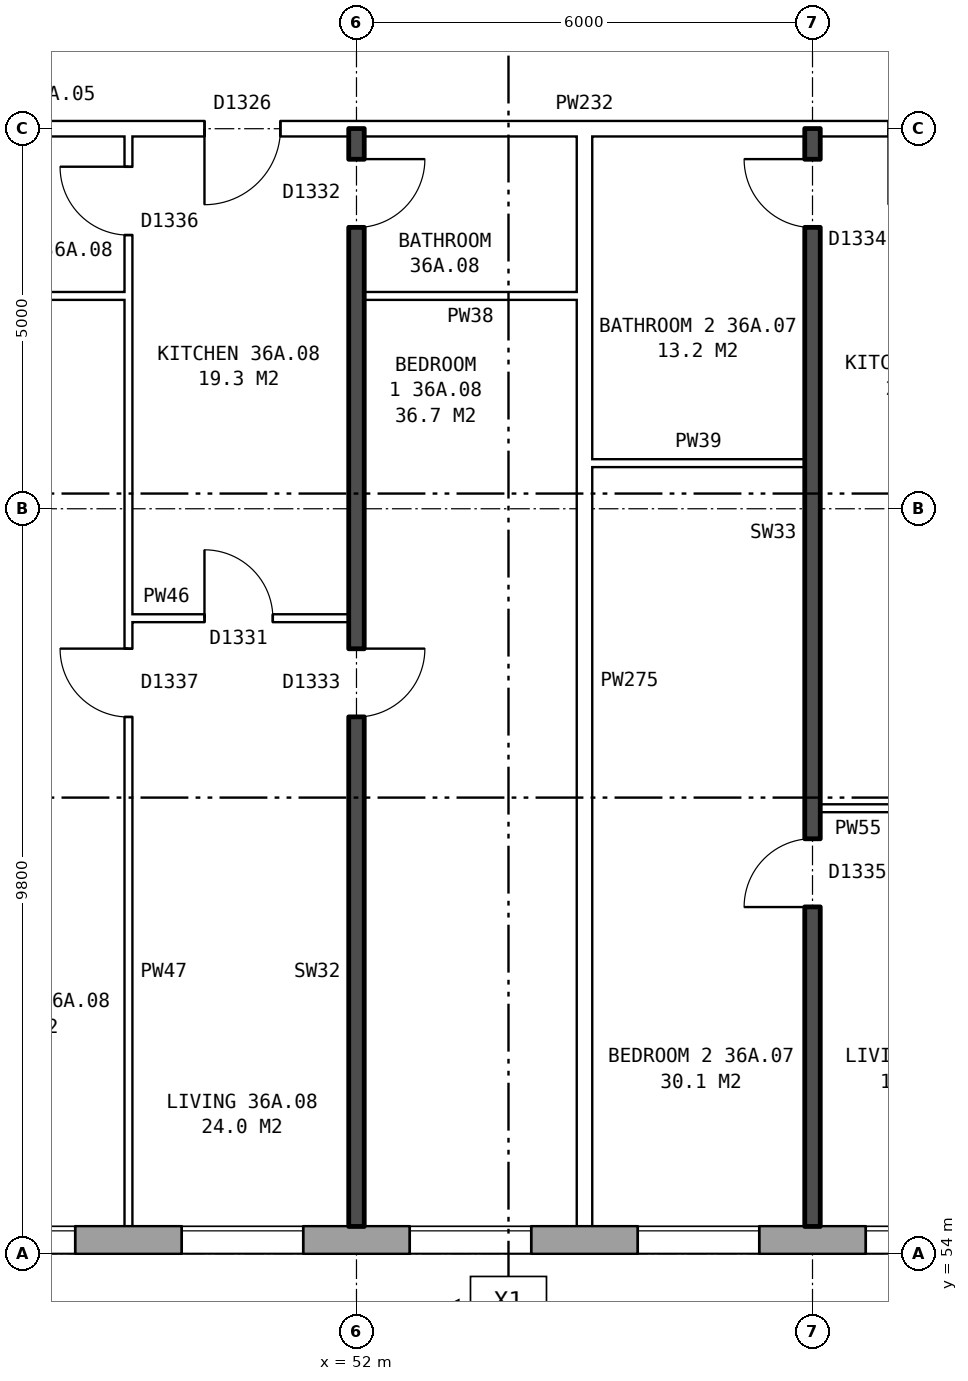
"""IFC4 building model, lengths in metres.
Left out: names, types, materials, properties, quantities, classifications, styles, units other than length and angle.
Written with IfcOpenShell. Run it as: python <this file> out.ifc"""

import sys

from ifc_helpers import new_model, si_unit, direction, frame, frame_2d, origin, place, context, subcontext, project, spatial, rectangle, extrude, element, fill, save


model = new_model("IFC4")
c1 = context("Model", 3, precision=1e-05, world=origin(), true_north=direction((0.0, 1.0)))
c2 = subcontext(c1, "Body", "Model", "MODEL_VIEW")
j1 = project(units=[si_unit("LENGTHUNIT", "METRE"), si_unit("PLANEANGLEUNIT", "RADIAN")], contexts=[c1])
p1 = place(None, origin())
s1 = spatial("IfcSite", under=j1, at=p1, CompositionType="ELEMENT")
p2 = place(p1, origin())
s2 = spatial("IfcBuilding", under=s1, at=p2, CompositionType="ELEMENT")
p3 = place(p2, frame((0.0, 0.0, 129.9)))
s3 = spatial("IfcBuildingStorey", under=s2, at=p3, CompositionType="ELEMENT", Elevation=129.9)
p4 = place(p3, frame((29.825, 54.18, 0.0), z_axis=(0.0, 0.0, 1.0), x_axis=(1.0, 0.0, 0.0)))
e1 = element("IfcWall", 1, at=p4, inside=s3, PredefinedType="STANDARD", context=c2, shape_type="SweptSolid", body=[
    extrude(rectangle(XDim=43.101, YDim=0.36, at=frame_2d((21.55, 0.0))), origin(), (0.0, 0.0, 1.0), 2.85),
])
p5 = place(p4, frame((1.875, 0.0, 0.8)))
e2 = element("IfcOpeningElement", 2, at=p5, cuts=e1, PredefinedType="OPENING", context=c2, shape_type="SweptSolid", body=[
    extrude(rectangle(XDim=1.6, YDim=1.8, at=frame_2d((0.8, 0.9))), frame((0.0, 0.19, 0.0), z_axis=(0.0, -1.0, 0.0), x_axis=(1.0, 0.0, 0.0)), (0.0, 0.0, 1.0), 0.38),
])
p6 = place(p4, frame((4.875, 0.0, 0.8)))
e3 = element("IfcOpeningElement", 3, at=p6, cuts=e1, PredefinedType="OPENING", context=c2, shape_type="SweptSolid", body=[
    extrude(rectangle(XDim=1.6, YDim=1.8, at=frame_2d((0.8, 0.9))), frame((0.0, 0.19, 0.0), z_axis=(0.0, -1.0, 0.0), x_axis=(1.0, 0.0, 0.0)), (0.0, 0.0, 1.0), 0.38),
])
p7 = place(p4, frame((6.775, 0.0, 0.8)))
e4 = element("IfcOpeningElement", 4, at=p7, cuts=e1, PredefinedType="OPENING", context=c2, shape_type="SweptSolid", body=[
    extrude(rectangle(XDim=1.6, YDim=1.8, at=frame_2d((0.8, 0.9))), frame((0.0, 0.19, 0.0), z_axis=(0.0, -1.0, 0.0), x_axis=(1.0, 0.0, 0.0)), (0.0, 0.0, 1.0), 0.38),
])
p8 = place(p4, frame((10.875, 0.0, 0.8)))
e5 = element("IfcOpeningElement", 5, at=p8, cuts=e1, PredefinedType="OPENING", context=c2, shape_type="SweptSolid", body=[
    extrude(rectangle(XDim=0.8, YDim=0.9, at=frame_2d((0.4, 0.45))), frame((0.0, 0.19, 0.0), z_axis=(0.0, -1.0, 0.0), x_axis=(1.0, 0.0, 0.0)), (0.0, 0.0, 1.0), 0.38),
])
p9 = place(p4, frame((13.875, 0.0, 0.8)))
e6 = element("IfcOpeningElement", 6, at=p9, cuts=e1, PredefinedType="OPENING", context=c2, shape_type="SweptSolid", body=[
    extrude(rectangle(XDim=1.6, YDim=1.8, at=frame_2d((0.8, 0.9))), frame((0.0, 0.19, 0.0), z_axis=(0.0, -1.0, 0.0), x_axis=(1.0, 0.0, 0.0)), (0.0, 0.0, 1.0), 0.38),
])
p10 = place(p4, frame((16.875, 0.0, 0.8)))
e7 = element("IfcOpeningElement", 7, at=p10, cuts=e1, PredefinedType="OPENING", context=c2, shape_type="SweptSolid", body=[
    extrude(rectangle(XDim=1.6, YDim=1.8, at=frame_2d((0.8, 0.9))), frame((0.0, 0.19, 0.0), z_axis=(0.0, -1.0, 0.0), x_axis=(1.0, 0.0, 0.0)), (0.0, 0.0, 1.0), 0.38),
])
p11 = place(p4, frame((19.875, 0.0, 0.8)))
e8 = element("IfcOpeningElement", 8, at=p11, cuts=e1, PredefinedType="OPENING", context=c2, shape_type="SweptSolid", body=[
    extrude(rectangle(XDim=1.6, YDim=1.8, at=frame_2d((0.8, 0.9))), frame((0.0, 0.19, 0.0), z_axis=(0.0, -1.0, 0.0), x_axis=(1.0, 0.0, 0.0)), (0.0, 0.0, 1.0), 0.38),
])
p12 = place(p4, frame((22.875, 0.0, 0.8)))
e9 = element("IfcOpeningElement", 9, at=p12, cuts=e1, PredefinedType="OPENING", context=c2, shape_type="SweptSolid", body=[
    extrude(rectangle(XDim=1.6, YDim=1.8, at=frame_2d((0.8, 0.9))), frame((0.0, 0.19, 0.0), z_axis=(0.0, -1.0, 0.0), x_axis=(1.0, 0.0, 0.0)), (0.0, 0.0, 1.0), 0.38),
])
p13 = place(p4, frame((25.875, 0.0, 0.8)))
e10 = element("IfcOpeningElement", 10, at=p13, cuts=e1, PredefinedType="OPENING", context=c2, shape_type="SweptSolid", body=[
    extrude(rectangle(XDim=1.6, YDim=1.8, at=frame_2d((0.8, 0.9))), frame((0.0, 0.19, 0.0), z_axis=(0.0, -1.0, 0.0), x_axis=(1.0, 0.0, 0.0)), (0.0, 0.0, 1.0), 0.38),
])
p14 = place(p4, frame((28.875, 0.0, 0.8)))
e11 = element("IfcOpeningElement", 11, at=p14, cuts=e1, PredefinedType="OPENING", context=c2, shape_type="SweptSolid", body=[
    extrude(rectangle(XDim=1.6, YDim=1.8, at=frame_2d((0.8, 0.9))), frame((0.0, 0.19, 0.0), z_axis=(0.0, -1.0, 0.0), x_axis=(1.0, 0.0, 0.0)), (0.0, 0.0, 1.0), 0.38),
])
p15 = place(p4, frame((31.325, 0.0, 0.15)))
e12 = element("IfcOpeningElement", 12, at=p15, cuts=e1, PredefinedType="OPENING", context=c2, shape_type="SweptSolid", body=[
    extrude(rectangle(XDim=0.6, YDim=1.8, at=frame_2d((0.3, 0.9))), frame((0.0, 0.19, 0.0), z_axis=(0.0, -1.0, 0.0), x_axis=(1.0, 0.0, 0.0)), (0.0, 0.0, 1.0), 0.38),
])
p16 = place(p4, frame((34.875, 0.0, 0.8)))
e13 = element("IfcOpeningElement", 13, at=p16, cuts=e1, PredefinedType="OPENING", context=c2, shape_type="SweptSolid", body=[
    extrude(rectangle(XDim=1.6, YDim=1.8, at=frame_2d((0.8, 0.9))), frame((0.0, 0.19, 0.0), z_axis=(0.0, -1.0, 0.0), x_axis=(1.0, 0.0, 0.0)), (0.0, 0.0, 1.0), 0.38),
])
p17 = place(p4, frame((37.875, 0.0, 0.8)))
e14 = element("IfcOpeningElement", 14, at=p17, cuts=e1, PredefinedType="OPENING", context=c2, shape_type="SweptSolid", body=[
    extrude(rectangle(XDim=1.6, YDim=1.8, at=frame_2d((0.8, 0.9))), frame((0.0, 0.19, 0.0), z_axis=(0.0, -1.0, 0.0), x_axis=(1.0, 0.0, 0.0)), (0.0, 0.0, 1.0), 0.38),
])
p18 = place(p4, frame((40.875, 0.0, 0.8)))
e15 = element("IfcOpeningElement", 15, at=p18, cuts=e1, PredefinedType="OPENING", context=c2, shape_type="SweptSolid", body=[
    extrude(rectangle(XDim=1.6, YDim=1.8, at=frame_2d((0.8, 0.9))), frame((0.0, 0.19, 0.0), z_axis=(0.0, -1.0, 0.0), x_axis=(1.0, 0.0, 0.0)), (0.0, 0.0, 1.0), 0.38),
])
p19 = place(p4, frame((8.675, 0.0, 1.3)))
e16 = element("IfcOpeningElement", 16, at=p19, cuts=e1, PredefinedType="OPENING", context=c2, shape_type="SweptSolid", body=[
    extrude(rectangle(XDim=0.6, YDim=1.2, at=frame_2d((0.3, 0.6))), frame((0.0, 0.19, 0.0), z_axis=(0.0, -1.0, 0.0), x_axis=(1.0, 0.0, 0.0)), (0.0, 0.0, 1.0), 0.38),
])
p20 = place(p4, frame((11.975, 0.0, 0.8)))
e17 = element("IfcOpeningElement", 17, at=p20, cuts=e1, PredefinedType="OPENING", context=c2, shape_type="SweptSolid", body=[
    extrude(rectangle(XDim=1.6, YDim=1.8, at=frame_2d((0.8, 0.9))), frame((0.0, 0.19, 0.0), z_axis=(0.0, -1.0, 0.0), x_axis=(1.0, 0.0, 0.0)), (0.0, 0.0, 1.0), 0.38),
])
p21 = place(p4, frame((32.225, 0.0, 0.25)))
e18 = element("IfcOpeningElement", 18, at=p21, cuts=e1, PredefinedType="OPENING", context=c2, shape_type="SweptSolid", body=[
    extrude(rectangle(XDim=0.6, YDim=0.9, at=frame_2d((0.3, 0.45))), frame((0.0, 0.19, 0.0), z_axis=(0.0, -1.0, 0.0), x_axis=(1.0, 0.0, 0.0)), (0.0, 0.0, 1.0), 0.38),
])
p22 = place(p3, frame((58.1, 59.86, 0.0), z_axis=(0.0, 0.0, 1.0), x_axis=(1.0, 0.0, 0.0)))
e19 = element("IfcWall", 19, at=p22, inside=s3, PredefinedType="PARTITIONING", context=c2, shape_type="SweptSolid", body=[
    extrude(rectangle(XDim=2.9, YDim=0.1, at=frame_2d((1.45, 0.0))), origin(), (0.0, 0.0, 1.0), 2.85),
])
p23 = place(p22, frame((1.0, 0.0, 0.0)))
e20 = element("IfcOpeningElement", 20, at=p23, cuts=e19, PredefinedType="OPENING", context=c2, shape_type="SweptSolid", body=[
    extrude(rectangle(XDim=0.9, YDim=2.1, at=frame_2d((0.45, 1.05))), frame((0.0, 0.06, 0.0), z_axis=(0.0, -1.0, 0.0), x_axis=(1.0, 0.0, 0.0)), (0.0, 0.0, 1.0), 0.12),
])
p24 = place(p3, frame((49.0, 62.36, 0.0), z_axis=(0.0, 0.0, 1.0), x_axis=(1.0, 0.0, 0.0)))
e21 = element("IfcWall", 21, at=p24, inside=s3, PredefinedType="PARTITIONING", context=c2, shape_type="SweptSolid", body=[
    extrude(rectangle(XDim=2.9, YDim=0.1, at=frame_2d((1.45, 0.0))), origin(), (0.0, 0.0, 1.0), 2.85),
])
p25 = place(p24, frame((1.0, 0.0, 0.0)))
e22 = element("IfcOpeningElement", 22, at=p25, cuts=e21, PredefinedType="OPENING", context=c2, shape_type="SweptSolid", body=[
    extrude(rectangle(XDim=0.9, YDim=2.1, at=frame_2d((0.45, 1.05))), frame((0.0, 0.06, 0.0), z_axis=(0.0, -1.0, 0.0), x_axis=(1.0, 0.0, 0.0)), (0.0, 0.0, 1.0), 0.12),
])
p26 = place(p3, frame((55.1, 64.4, 0.0), z_axis=(0.0, 0.0, 1.0), x_axis=(1.0, 0.0, 0.0)))
e23 = element("IfcWall", 23, at=p26, inside=s3, PredefinedType="PARTITIONING", context=c2, shape_type="SweptSolid", body=[
    extrude(rectangle(XDim=2.8, YDim=0.1, at=frame_2d((1.4, 0.0))), origin(), (0.0, 0.0, 1.0), 2.85),
])
p27 = place(p3, frame((46.1, 66.6, 0.0), z_axis=(0.0, 0.0, 1.0), x_axis=(1.0, 0.0, 0.0)))
e24 = element("IfcWall", 24, at=p27, inside=s3, PredefinedType="PARTITIONING", context=c2, shape_type="SweptSolid", body=[
    extrude(rectangle(XDim=2.9, YDim=0.1, at=frame_2d((1.45, 0.0))), origin(), (0.0, 0.0, 1.0), 2.85),
])
p28 = place(p3, frame((52.1, 66.6, 0.0), z_axis=(0.0, 0.0, 1.0), x_axis=(1.0, 0.0, 0.0)))
e25 = element("IfcWall", 25, at=p28, inside=s3, PredefinedType="PARTITIONING", context=c2, shape_type="SweptSolid", body=[
    extrude(rectangle(XDim=2.8, YDim=0.1, at=frame_2d((1.4, 0.0))), origin(), (0.0, 0.0, 1.0), 2.85),
])
p29 = place(p3, frame((44.36, 68.8, 0.0), z_axis=(0.0, 0.0, 1.0), x_axis=(1.0, 0.0, 0.0)))
e26 = element("IfcWall", 26, at=p29, inside=s3, PredefinedType="PARTITIONING", context=c2, shape_type="SweptSolid", body=[
    extrude(rectangle(XDim=19.28, YDim=0.2, at=frame_2d((9.64, 0.0))), origin(), (0.0, 0.0, 1.0), 2.85),
])
p30 = place(p29, frame((14.64, 0.0, 0.0)))
e27 = element("IfcOpeningElement", 27, at=p30, cuts=e26, PredefinedType="OPENING", context=c2, shape_type="SweptSolid", body=[
    extrude(rectangle(XDim=1.0, YDim=2.1, at=frame_2d((0.5, 1.05))), frame((0.0, 0.11, 0.0), z_axis=(0.0, -1.0, 0.0), x_axis=(1.0, 0.0, 0.0)), (0.0, 0.0, 1.0), 0.22),
])
p31 = place(p29, frame((5.64, 0.0, 0.0)))
e28 = element("IfcOpeningElement", 28, at=p31, cuts=e26, PredefinedType="OPENING", context=c2, shape_type="SweptSolid", body=[
    extrude(rectangle(XDim=1.0, YDim=2.1, at=frame_2d((0.5, 1.05))), frame((0.0, 0.11, 0.0), z_axis=(0.0, -1.0, 0.0), x_axis=(1.0, 0.0, 0.0)), (0.0, 0.0, 1.0), 0.22),
])
p32 = place(p3, frame((49.0, 54.36, 0.0), z_axis=(0.0, 0.0, 1.0), x_axis=(0.0, 1.0, 0.0)))
e29 = element("IfcWall", 29, at=p32, inside=s3, PredefinedType="PARTITIONING", context=c2, shape_type="SweptSolid", body=[
    extrude(rectangle(XDim=14.34, YDim=0.1, at=frame_2d((7.17, 0.0))), origin(), (0.0, 0.0, 1.0), 2.85),
])
p33 = place(p32, frame((6.7, 0.0, 0.0)))
e30 = element("IfcOpeningElement", 30, at=p33, cuts=e29, PredefinedType="OPENING", context=c2, shape_type="SweptSolid", body=[
    extrude(rectangle(XDim=0.9, YDim=2.1, at=frame_2d((0.45, 1.05))), frame((0.0, 0.06, 0.0), z_axis=(0.0, -1.0, 0.0), x_axis=(1.0, 0.0, 0.0)), (0.0, 0.0, 1.0), 0.12),
])
p34 = place(p32, frame((13.04, 0.0, 0.0)))
e31 = element("IfcOpeningElement", 31, at=p34, cuts=e29, PredefinedType="OPENING", context=c2, shape_type="SweptSolid", body=[
    extrude(rectangle(XDim=0.9, YDim=2.1, at=frame_2d((0.45, 1.05))), frame((0.0, 0.06, 0.0), z_axis=(0.0, -1.0, 0.0), x_axis=(1.0, 0.0, 0.0)), (0.0, 0.0, 1.0), 0.12),
])
p35 = place(p3, frame((52.0, 54.36, 0.0), z_axis=(0.0, 0.0, 1.0), x_axis=(0.0, 1.0, 0.0)))
e32 = element("IfcWall", 32, at=p35, inside=s3, PredefinedType="SOLIDWALL", context=c2, shape_type="SweptSolid", body=[
    extrude(rectangle(XDim=14.44, YDim=0.2, at=frame_2d((7.22, 0.0))), origin(), (0.0, 0.0, 1.0), 2.85),
])
p36 = place(p35, frame((6.7, 0.0, 0.0)))
e33 = element("IfcOpeningElement", 33, at=p36, cuts=e32, PredefinedType="OPENING", context=c2, shape_type="SweptSolid", body=[
    extrude(rectangle(XDim=0.9, YDim=2.1, at=frame_2d((0.45, 1.05))), frame((0.0, 0.11, 0.0), z_axis=(0.0, -1.0, 0.0), x_axis=(1.0, 0.0, 0.0)), (0.0, 0.0, 1.0), 0.22),
])
p37 = place(p35, frame((13.14, 0.0, 0.0)))
e34 = element("IfcOpeningElement", 34, at=p37, cuts=e32, PredefinedType="OPENING", context=c2, shape_type="SweptSolid", body=[
    extrude(rectangle(XDim=0.9, YDim=2.1, at=frame_2d((0.45, 1.05))), frame((0.0, 0.11, 0.0), z_axis=(0.0, -1.0, 0.0), x_axis=(1.0, 0.0, 0.0)), (0.0, 0.0, 1.0), 0.22),
])
p38 = place(p3, frame((55.0, 54.36, 0.0), z_axis=(0.0, 0.0, 1.0), x_axis=(0.0, 1.0, 0.0)))
e35 = element("IfcWall", 35, at=p38, inside=s3, PredefinedType="PARTITIONING", context=c2, shape_type="SweptSolid", body=[
    extrude(rectangle(XDim=14.34, YDim=0.2, at=frame_2d((7.17, 0.0))), origin(), (0.0, 0.0, 1.0), 2.85),
])
p39 = place(p3, frame((58.0, 54.36, 0.0), z_axis=(0.0, 0.0, 1.0), x_axis=(0.0, 1.0, 0.0)))
e36 = element("IfcWall", 36, at=p39, inside=s3, PredefinedType="SOLIDWALL", context=c2, shape_type="SweptSolid", body=[
    extrude(rectangle(XDim=14.44, YDim=0.2, at=frame_2d((7.22, 0.0))), origin(), (0.0, 0.0, 1.0), 2.85),
])
p40 = place(p39, frame((4.2, 0.0, 0.0)))
e37 = element("IfcOpeningElement", 37, at=p40, cuts=e36, PredefinedType="OPENING", context=c2, shape_type="SweptSolid", body=[
    extrude(rectangle(XDim=0.9, YDim=2.1, at=frame_2d((0.45, 1.05))), frame((0.0, 0.11, 0.0), z_axis=(0.0, -1.0, 0.0), x_axis=(1.0, 0.0, 0.0)), (0.0, 0.0, 1.0), 0.22),
])
p41 = place(p39, frame((13.14, 0.0, 0.0)))
e38 = element("IfcOpeningElement", 38, at=p41, cuts=e36, PredefinedType="OPENING", context=c2, shape_type="SweptSolid", body=[
    extrude(rectangle(XDim=0.9, YDim=2.1, at=frame_2d((0.45, 1.05))), frame((0.0, 0.11, 0.0), z_axis=(0.0, -1.0, 0.0), x_axis=(1.0, 0.0, 0.0)), (0.0, 0.0, 1.0), 0.22),
])
p42 = place(p10, origin())
e39 = element("IfcWindow", 39, at=p42, inside=s3, PartitioningType="SINGLE_PANEL", PredefinedType="WINDOW", context=c2, shape_type="SweptSolid", body=[
    extrude(rectangle(XDim=1.6, YDim=1.8, at=frame_2d((0.8, 0.9))), frame((0.0, 0.15, 0.0), z_axis=(0.0, -1.0, 0.0), x_axis=(1.0, 0.0, 0.0)), (0.0, 0.0, 1.0), 0.06),
])
fill(e7, e39)
p43 = place(p11, origin())
e40 = element("IfcWindow", 40, at=p43, inside=s3, PartitioningType="SINGLE_PANEL", PredefinedType="WINDOW", context=c2, shape_type="SweptSolid", body=[
    extrude(rectangle(XDim=1.6, YDim=1.8, at=frame_2d((0.8, 0.9))), frame((0.0, 0.15, 0.0), z_axis=(0.0, -1.0, 0.0), x_axis=(1.0, 0.0, 0.0)), (0.0, 0.0, 1.0), 0.06),
])
fill(e8, e40)
p44 = place(p12, origin())
e41 = element("IfcWindow", 41, at=p44, inside=s3, PartitioningType="SINGLE_PANEL", PredefinedType="WINDOW", context=c2, shape_type="SweptSolid", body=[
    extrude(rectangle(XDim=1.6, YDim=1.8, at=frame_2d((0.8, 0.9))), frame((0.0, 0.15, 0.0), z_axis=(0.0, -1.0, 0.0), x_axis=(1.0, 0.0, 0.0)), (0.0, 0.0, 1.0), 0.06),
])
fill(e9, e41)
p45 = place(p13, origin())
e42 = element("IfcWindow", 42, at=p45, inside=s3, PartitioningType="SINGLE_PANEL", PredefinedType="WINDOW", context=c2, shape_type="SweptSolid", body=[
    extrude(rectangle(XDim=1.6, YDim=1.8, at=frame_2d((0.8, 0.9))), frame((0.0, 0.15, 0.0), z_axis=(0.0, -1.0, 0.0), x_axis=(1.0, 0.0, 0.0)), (0.0, 0.0, 1.0), 0.06),
])
fill(e10, e42)
p46 = place(p14, origin())
e43 = element("IfcWindow", 43, at=p46, inside=s3, PartitioningType="SINGLE_PANEL", PredefinedType="WINDOW", context=c2, shape_type="SweptSolid", body=[
    extrude(rectangle(XDim=1.6, YDim=1.8, at=frame_2d((0.8, 0.9))), frame((0.0, 0.15, 0.0), z_axis=(0.0, -1.0, 0.0), x_axis=(1.0, 0.0, 0.0)), (0.0, 0.0, 1.0), 0.06),
])
fill(e11, e43)
p47 = place(p40, origin())
e44 = element("IfcDoor", 44, at=p47, inside=s3, OperationType="SINGLE_SWING_LEFT", PredefinedType="DOOR", context=c2, shape_type="SweptSolid", body=[
    extrude(rectangle(XDim=0.9, YDim=2.1, at=frame_2d((0.45, 1.05))), frame((0.0, 0.025, 0.0), z_axis=(0.0, -1.0, 0.0), x_axis=(1.0, 0.0, 0.0)), (0.0, 0.0, 1.0), 0.05),
])
fill(e37, e44)
p48 = place(p41, origin())
e45 = element("IfcDoor", 45, at=p48, inside=s3, OperationType="SINGLE_SWING_RIGHT", PredefinedType="DOOR", context=c2, shape_type="SweptSolid", body=[
    extrude(rectangle(XDim=0.9, YDim=2.1, at=frame_2d((0.45, 1.05))), frame((0.0, 0.025, 0.0), z_axis=(0.0, -1.0, 0.0), x_axis=(1.0, 0.0, 0.0)), (0.0, 0.0, 1.0), 0.05),
])
fill(e38, e45)
p49 = place(p36, frame((0.9, 0.0, 0.0), z_axis=(0.0, 0.0, 1.0), x_axis=(-1.0, 0.0, 0.0)))
e46 = element("IfcDoor", 46, at=p49, inside=s3, OperationType="SINGLE_SWING_LEFT", PredefinedType="DOOR", context=c2, shape_type="SweptSolid", body=[
    extrude(rectangle(XDim=0.9, YDim=2.1, at=frame_2d((0.45, 1.05))), frame((0.0, 0.025, 0.0), z_axis=(0.0, -1.0, 0.0), x_axis=(1.0, 0.0, 0.0)), (0.0, 0.0, 1.0), 0.05),
])
fill(e33, e46)
p50 = place(p33, origin())
e47 = element("IfcDoor", 47, at=p50, inside=s3, OperationType="SINGLE_SWING_RIGHT", PredefinedType="DOOR", context=c2, shape_type="SweptSolid", body=[
    extrude(rectangle(XDim=0.9, YDim=2.1, at=frame_2d((0.45, 1.05))), frame((0.0, 0.025, 0.0), z_axis=(0.0, -1.0, 0.0), x_axis=(1.0, 0.0, 0.0)), (0.0, 0.0, 1.0), 0.05),
])
fill(e30, e47)
p51 = place(p31, frame((1.0, 0.0, 0.0), z_axis=(0.0, 0.0, 1.0), x_axis=(-1.0, 0.0, 0.0)))
e48 = element("IfcDoor", 48, at=p51, inside=s3, OperationType="SINGLE_SWING_RIGHT", PredefinedType="DOOR", context=c2, shape_type="SweptSolid", body=[
    extrude(rectangle(XDim=1.0, YDim=2.1, at=frame_2d((0.5, 1.05))), frame((0.0, 0.025, 0.0), z_axis=(0.0, -1.0, 0.0), x_axis=(1.0, 0.0, 0.0)), (0.0, 0.0, 1.0), 0.05),
])
fill(e28, e48)
p52 = place(p25, origin())
e49 = element("IfcDoor", 49, at=p52, inside=s3, OperationType="SINGLE_SWING_LEFT", PredefinedType="DOOR", context=c2, shape_type="SweptSolid", body=[
    extrude(rectangle(XDim=0.9, YDim=2.1, at=frame_2d((0.45, 1.05))), frame((0.0, 0.025, 0.0), z_axis=(0.0, -1.0, 0.0), x_axis=(1.0, 0.0, 0.0)), (0.0, 0.0, 1.0), 0.05),
])
fill(e22, e49)
p53 = place(p37, frame((0.9, 0.0, 0.0), z_axis=(0.0, 0.0, 1.0), x_axis=(-1.0, 0.0, 0.0)))
e50 = element("IfcDoor", 50, at=p53, inside=s3, OperationType="SINGLE_SWING_LEFT", PredefinedType="DOOR", context=c2, shape_type="SweptSolid", body=[
    extrude(rectangle(XDim=0.9, YDim=2.1, at=frame_2d((0.45, 1.05))), frame((0.0, 0.025, 0.0), z_axis=(0.0, -1.0, 0.0), x_axis=(1.0, 0.0, 0.0)), (0.0, 0.0, 1.0), 0.05),
])
fill(e34, e50)
p54 = place(p34, origin())
e51 = element("IfcDoor", 51, at=p54, inside=s3, OperationType="SINGLE_SWING_RIGHT", PredefinedType="DOOR", context=c2, shape_type="SweptSolid", body=[
    extrude(rectangle(XDim=0.9, YDim=2.1, at=frame_2d((0.45, 1.05))), frame((0.0, 0.025, 0.0), z_axis=(0.0, -1.0, 0.0), x_axis=(1.0, 0.0, 0.0)), (0.0, 0.0, 1.0), 0.05),
])
fill(e31, e51)
save(model, sys.argv[1])
